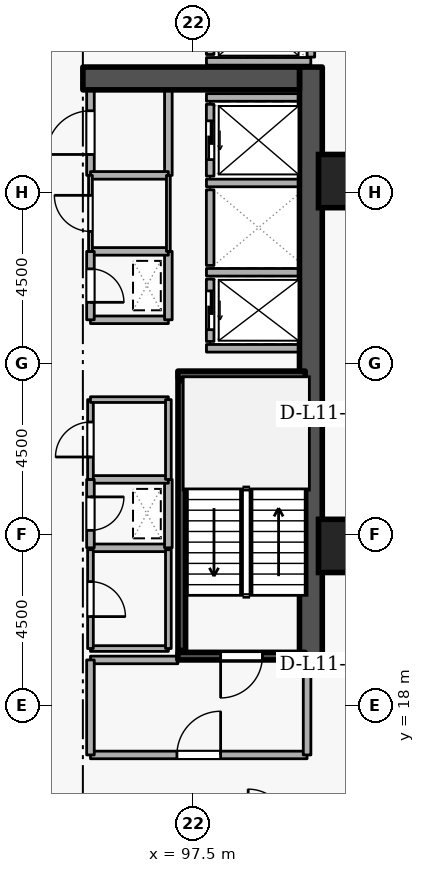
"""IFC4 building model, lengths in metres.
Left out: names, types, materials, properties, quantities, classifications, styles, units other than length and angle.
Written with IfcOpenShell. Run it as: python <this file> out.ifc"""

import sys

from ifc_helpers import new_model, si_unit, direction, frame, frame_2d, origin, origin_2d, place, context, subcontext, project, spatial, rectangle, extrude, element, fill, save


model = new_model("IFC4")
c1 = context("Model", 3, precision=1e-05, world=origin(), true_north=direction((0.0, 1.0)))
c2 = subcontext(c1, "Body", "Model", "MODEL_VIEW")
j1 = project(units=[si_unit("LENGTHUNIT", "METRE"), si_unit("PLANEANGLEUNIT", "RADIAN")], contexts=[c1])
p1 = place(None, origin())
s1 = spatial("IfcSite", under=j1, at=p1, CompositionType="ELEMENT")
p2 = place(p1, origin())
s2 = spatial("IfcBuilding", under=s1, at=p2, CompositionType="ELEMENT")
p3 = place(p2, frame((0.0, 0.0, 45.9)))
s3 = spatial("IfcBuildingStorey", under=s2, at=p3, CompositionType="ELEMENT", Elevation=45.9)
p4 = place(p3, frame((100.6, 19.2, 0.0), z_axis=(0.0, 0.0, 1.0), x_axis=(0.0, 1.0, 0.0)))
e1 = element("IfcWall", 1, at=p4, inside=s3, PredefinedType="SHEAR", context=c2, shape_type="SweptSolid", body=[
    extrude(rectangle(XDim=15.6, YDim=0.6, at=frame_2d((7.8, 0.0))), origin(), (0.0, 0.0, 1.0), 3.6),
])
p5 = place(p3, frame((94.6, 34.5, 0.0), z_axis=(0.0, 0.0, 1.0), x_axis=(1.0, 0.0, 0.0)))
e2 = element("IfcWall", 2, at=p5, inside=s3, PredefinedType="SHEAR", context=c2, shape_type="SweptSolid", body=[
    extrude(rectangle(XDim=5.7, YDim=0.6, at=frame_2d((2.85, 0.0))), origin(), (0.0, 0.0, 1.0), 3.6),
])
for number, where, z_axis, x_axis in (
    (3, (101.5, 22.2, 0.0), (0.0, 0.0, 1.0), (1.0, 0.0, 0.0)),
    (4, (101.5, 31.8, 0.0), (0.0, 0.0, 1.0), (1.0, 0.0, 0.0)),
):
    element("IfcColumn", number, at=place(p3, frame(where, z_axis=z_axis, x_axis=x_axis)), inside=s3, PredefinedType="COLUMN", context=c2, shape_type="SweptSolid", body=[
        extrude(rectangle(XDim=1.4, YDim=1.4, at=origin_2d()), origin(), (0.0, 0.0, 1.0), 3.6),
    ])
p6 = place(p3, frame((97.95, 29.22, 0.0), z_axis=(0.0, 0.0, 1.0), x_axis=(0.0, -1.0, 0.0)))
e5 = element("IfcWall", 5, at=p6, inside=s3, PredefinedType="STANDARD", context=c2, shape_type="SweptSolid", body=[
    extrude(rectangle(XDim=1.64, YDim=0.2, at=frame_2d((0.82, 0.0))), origin(), (0.0, 0.0, 1.0), 3.26),
])
p7 = place(p6, frame((0.31, 0.0, 0.0)))
e6 = element("IfcOpeningElement", 6, at=p7, cuts=e5, PredefinedType="OPENING", context=c2, shape_type="SweptSolid", body=[
    extrude(rectangle(XDim=1.02, YDim=2.06, at=frame_2d((0.51, 1.03))), frame((0.0, 0.11, 0.0), z_axis=(0.0, -1.0, 0.0), x_axis=(1.0, 0.0, 0.0)), (0.0, 0.0, 1.0), 0.22),
])
p8 = place(p3, frame((97.95, 31.57, 0.0), z_axis=(0.0, 0.0, 1.0), x_axis=(0.0, -1.0, 0.0)))
e7 = element("IfcWall", 7, at=p8, inside=s3, PredefinedType="STANDARD", context=c2, shape_type="SweptSolid", body=[
    extrude(rectangle(XDim=1.99, YDim=0.2, at=frame_2d((0.995, 0.0))), origin(), (0.0, 0.0, 1.0), 3.26),
])
p9 = place(p3, frame((97.95, 33.82, 0.0), z_axis=(0.0, 0.0, 1.0), x_axis=(0.0, -1.0, 0.0)))
e8 = element("IfcWall", 8, at=p9, inside=s3, PredefinedType="STANDARD", context=c2, shape_type="SweptSolid", body=[
    extrude(rectangle(XDim=1.89, YDim=0.2, at=frame_2d((0.945, 0.0))), origin(), (0.0, 0.0, 1.0), 3.26),
])
p10 = place(p9, frame((0.435, 0.0, 0.0)))
e9 = element("IfcOpeningElement", 9, at=p10, cuts=e8, PredefinedType="OPENING", context=c2, shape_type="SweptSolid", body=[
    extrude(rectangle(XDim=1.02, YDim=2.06, at=frame_2d((0.51, 1.03))), frame((0.0, 0.11, 0.0), z_axis=(0.0, -1.0, 0.0), x_axis=(1.0, 0.0, 0.0)), (0.0, 0.0, 1.0), 0.22),
])
p11 = place(p3, frame((97.95, 36.87, 0.0), z_axis=(0.0, 0.0, 1.0), x_axis=(0.0, -1.0, 0.0)))
e10 = element("IfcWall", 10, at=p11, inside=s3, PredefinedType="STANDARD", context=c2, shape_type="SweptSolid", body=[
    extrude(rectangle(XDim=1.74, YDim=0.2, at=frame_2d((0.87, 0.0))), origin(), (0.0, 0.0, 1.0), 3.26),
])
p12 = place(p11, frame((0.36, 0.0, 0.0)))
e11 = element("IfcOpeningElement", 11, at=p12, cuts=e10, PredefinedType="OPENING", context=c2, shape_type="SweptSolid", body=[
    extrude(rectangle(XDim=1.02, YDim=2.06, at=frame_2d((0.51, 1.03))), frame((0.0, 0.11, 0.0), z_axis=(0.0, -1.0, 0.0), x_axis=(1.0, 0.0, 0.0)), (0.0, 0.0, 1.0), 0.22),
])
p13 = place(p3, frame((97.852, 29.4, 0.0), z_axis=(0.0, 0.0, 1.0), x_axis=(1.0, 0.0, 0.0)))
e12 = element("IfcWall", 12, at=p13, inside=s3, PredefinedType="STANDARD", context=c2, shape_type="SweptSolid", body=[
    extrude(rectangle(XDim=2.436, YDim=0.2, at=frame_2d((1.218, 0.0))), origin(), (0.0, 0.0, 1.0), 3.26),
])
p14 = place(p3, frame((97.852, 27.4, 0.0), z_axis=(0.0, 0.0, 1.0), x_axis=(1.0, 0.0, 0.0)))
e13 = element("IfcWall", 13, at=p14, inside=s3, PredefinedType="STANDARD", context=c2, shape_type="SweptSolid", body=[
    extrude(rectangle(XDim=2.436, YDim=0.2, at=frame_2d((1.218, 0.0))), origin(), (0.0, 0.0, 1.0), 1.685),
])
for number, where, z_axis, x_axis in (
    (14, (97.852, 31.75, 0.0), (0.0, 0.0, 1.0), (1.0, 0.0, 0.0)),
    (15, (97.852, 34.0, 0.0), (0.0, 0.0, 1.0), (1.0, 0.0, 0.0)),
):
    element("IfcWall", number, at=place(p3, frame(where, z_axis=z_axis, x_axis=x_axis)), inside=s3, PredefinedType="STANDARD", context=c2, shape_type="SweptSolid", body=[
        extrude(rectangle(XDim=2.436, YDim=0.2, at=frame_2d((1.218, 0.0))), origin(), (0.0, 0.0, 1.0), 3.26),
    ])
p15 = place(p3, frame((97.852, 34.95, 0.0), z_axis=(0.0, 0.0, 1.0), x_axis=(1.0, 0.0, 0.0)))
e16 = element("IfcWall", 16, at=p15, inside=s3, PredefinedType="STANDARD", context=c2, shape_type="SweptSolid", body=[
    extrude(rectangle(XDim=2.746, YDim=0.2, at=frame_2d((1.373, 0.0))), origin(), (0.0, 0.0, 1.0), 3.26),
])
p16 = place(p3, frame((100.6, 35.062, 0.0), z_axis=(0.0, 0.0, 1.0), x_axis=(0.0, 1.0, 0.0)))
e17 = element("IfcWall", 17, at=p16, inside=s3, PredefinedType="STANDARD", context=c2, shape_type="SweptSolid", body=[
    extrude(rectangle(XDim=1.856, YDim=0.2, at=frame_2d((0.928, 0.0))), origin(), (0.0, 0.0, 1.0), 3.26),
])
p17 = place(p3, frame((100.45, 19.3, 0.0), z_axis=(0.0, 0.0, 1.0), x_axis=(-1.0, 0.0, 0.0)))
e18 = element("IfcWall", 18, at=p17, inside=s3, PredefinedType="SHEAR", context=c2, shape_type="SweptSolid", body=[
    extrude(rectangle(XDim=3.35, YDim=0.2, at=frame_2d((1.675, 0.0))), origin(), (0.0, 0.0, 1.0), 3.6),
])
p18 = place(p17, frame((1.125, 0.0, 0.0)))
e19 = element("IfcOpeningElement", 19, at=p18, cuts=e18, PredefinedType="OPENING", context=c2, shape_type="SweptSolid", body=[
    extrude(rectangle(XDim=1.1, YDim=2.1, at=frame_2d((0.55, 1.05))), frame((0.0, 0.11, 0.0), z_axis=(0.0, -1.0, 0.0), x_axis=(1.0, 0.0, 0.0)), (0.0, 0.0, 1.0), 0.22),
])
p19 = place(p3, frame((97.1, 26.7, 0.0), z_axis=(0.0, 0.0, 1.0), x_axis=(1.0, 0.0, 0.0)))
e20 = element("IfcWall", 20, at=p19, inside=s3, PredefinedType="SHEAR", context=c2, shape_type="SweptSolid", body=[
    extrude(rectangle(XDim=3.35, YDim=0.2, at=frame_2d((1.675, 0.0))), origin(), (0.0, 0.0, 1.0), 3.6),
])
p20 = place(p3, frame((97.203, 26.55, 0.0), z_axis=(0.0, 0.0, 1.0), x_axis=(0.0, -1.0, 0.0)))
e21 = element("IfcWall", 21, at=p20, inside=s3, PredefinedType="SHEAR", context=c2, shape_type="SweptSolid", body=[
    extrude(rectangle(XDim=7.1, YDim=0.2, at=frame_2d((3.55, 0.0))), origin(), (0.0, 0.0, 1.0), 3.6),
])
p21 = place(p3, frame((94.8, 16.7, 0.0), z_axis=(0.0, 0.0, 1.0), x_axis=(1.0, 0.0, 0.0)))
e22 = element("IfcWall", 22, at=p21, inside=s3, PredefinedType="STANDARD", context=c2, shape_type="SweptSolid", body=[
    extrude(rectangle(XDim=5.7, YDim=0.2, at=frame_2d((2.85, 0.0))), origin(), (0.0, 0.0, 1.0), 3.26),
])
p22 = place(p21, frame((2.275, 0.0, 0.0)))
e23 = element("IfcOpeningElement", 23, at=p22, cuts=e22, PredefinedType="OPENING", context=c2, shape_type="SweptSolid", body=[
    extrude(rectangle(XDim=1.15, YDim=2.1, at=frame_2d((0.575, 1.05))), frame((0.0, 0.11, 0.0), z_axis=(0.0, -1.0, 0.0), x_axis=(1.0, 0.0, 0.0)), (0.0, 0.0, 1.0), 0.22),
])
p23 = place(p3, frame((100.5, 16.7, 0.0), z_axis=(0.0, 0.0, 1.0), x_axis=(0.0, 1.0, 0.0)))
e24 = element("IfcWall", 24, at=p23, inside=s3, PredefinedType="STANDARD", context=c2, shape_type="SweptSolid", body=[
    extrude(rectangle(XDim=2.5, YDim=0.2, at=frame_2d((1.25, 0.0))), origin(), (0.0, 0.0, 1.0), 3.26),
])
p24 = place(p3, frame((97.1, 19.2, 0.0), z_axis=(0.0, 0.0, 1.0), x_axis=(-1.0, 0.0, 0.0)))
e25 = element("IfcWall", 25, at=p24, inside=s3, PredefinedType="STANDARD", context=c2, shape_type="SweptSolid", body=[
    extrude(rectangle(XDim=2.3, YDim=0.2, at=frame_2d((1.15, 0.0))), origin(), (0.0, 0.0, 1.0), 2.465),
])
p25 = place(p3, frame((94.8, 19.2, 0.0), z_axis=(0.0, 0.0, 1.0), x_axis=(0.0, -1.0, 0.0)))
e26 = element("IfcWall", 26, at=p25, inside=s3, PredefinedType="STANDARD", context=c2, shape_type="SweptSolid", body=[
    extrude(rectangle(XDim=2.5, YDim=0.2, at=frame_2d((1.25, 0.0))), origin(), (0.0, 0.0, 1.0), 3.26),
])
p26 = place(p3, frame((94.8, 28.15, 0.0), z_axis=(0.0, 0.0, 1.0), x_axis=(1.0, 0.0, 0.0)))
e27 = element("IfcWall", 27, at=p26, inside=s3, PredefinedType="STANDARD", context=c2, shape_type="SweptSolid", body=[
    extrude(rectangle(XDim=2.05, YDim=0.2, at=frame_2d((1.025, 0.0))), origin(), (0.0, 0.0, 1.0), 3.26),
])
p27 = place(p3, frame((96.85, 28.15, 0.0), z_axis=(0.0, 0.0, 1.0), x_axis=(0.0, 1.0, 0.0)))
e28 = element("IfcWall", 28, at=p27, inside=s3, PredefinedType="STANDARD", context=c2, shape_type="SweptSolid", body=[
    extrude(rectangle(XDim=1.8, YDim=0.2, at=frame_2d((0.9, 0.0))), origin(), (0.0, 0.0, 1.0), 3.26),
])
p28 = place(p3, frame((96.85, 29.95, 0.0), z_axis=(0.0, 0.0, 1.0), x_axis=(-1.0, 0.0, 0.0)))
e29 = element("IfcWall", 29, at=p28, inside=s3, PredefinedType="STANDARD", context=c2, shape_type="SweptSolid", body=[
    extrude(rectangle(XDim=2.05, YDim=0.2, at=frame_2d((1.025, 0.0))), origin(), (0.0, 0.0, 1.0), 3.26),
])
p29 = place(p3, frame((94.8, 29.95, 0.0), z_axis=(0.0, 0.0, 1.0), x_axis=(0.0, -1.0, 0.0)))
e30 = element("IfcWall", 30, at=p29, inside=s3, PredefinedType="STANDARD", context=c2, shape_type="SweptSolid", body=[
    extrude(rectangle(XDim=1.8, YDim=0.2, at=frame_2d((0.9, 0.0))), origin(), (0.0, 0.0, 1.0), 3.26),
])
p30 = place(p29, frame((0.46, 0.0, 0.0)))
e31 = element("IfcOpeningElement", 31, at=p30, cuts=e30, PredefinedType="OPENING", context=c2, shape_type="SweptSolid", body=[
    extrude(rectangle(XDim=0.88, YDim=2.04, at=frame_2d((0.44, 1.02))), frame((0.0, 0.11, 0.0), z_axis=(0.0, -1.0, 0.0), x_axis=(1.0, 0.0, 0.0)), (0.0, 0.0, 1.0), 0.22),
])
p31 = place(p3, frame((94.8, 22.15, 0.0), z_axis=(0.0, 0.0, 1.0), x_axis=(1.0, 0.0, 0.0)))
e32 = element("IfcWall", 32, at=p31, inside=s3, PredefinedType="STANDARD", context=c2, shape_type="SweptSolid", body=[
    extrude(rectangle(XDim=2.05, YDim=0.2, at=frame_2d((1.025, 0.0))), origin(), (0.0, 0.0, 1.0), 3.26),
])
p32 = place(p3, frame((96.85, 22.15, 0.0), z_axis=(0.0, 0.0, 1.0), x_axis=(0.0, 1.0, 0.0)))
e33 = element("IfcWall", 33, at=p32, inside=s3, PredefinedType="STANDARD", context=c2, shape_type="SweptSolid", body=[
    extrude(rectangle(XDim=1.8, YDim=0.2, at=frame_2d((0.9, 0.0))), origin(), (0.0, 0.0, 1.0), 3.26),
])
p33 = place(p3, frame((96.85, 23.95, 0.0), z_axis=(0.0, 0.0, 1.0), x_axis=(-1.0, 0.0, 0.0)))
e34 = element("IfcWall", 34, at=p33, inside=s3, PredefinedType="STANDARD", context=c2, shape_type="SweptSolid", body=[
    extrude(rectangle(XDim=2.05, YDim=0.2, at=frame_2d((1.025, 0.0))), origin(), (0.0, 0.0, 1.0), 3.26),
])
p34 = place(p3, frame((94.8, 23.95, 0.0), z_axis=(0.0, 0.0, 1.0), x_axis=(0.0, -1.0, 0.0)))
e35 = element("IfcWall", 35, at=p34, inside=s3, PredefinedType="STANDARD", context=c2, shape_type="SweptSolid", body=[
    extrude(rectangle(XDim=1.8, YDim=0.2, at=frame_2d((0.9, 0.0))), origin(), (0.0, 0.0, 1.0), 3.26),
])
p35 = place(p34, frame((0.46, 0.0, 0.0)))
e36 = element("IfcOpeningElement", 36, at=p35, cuts=e35, PredefinedType="OPENING", context=c2, shape_type="SweptSolid", body=[
    extrude(rectangle(XDim=0.88, YDim=2.04, at=frame_2d((0.44, 1.02))), frame((0.0, 0.11, 0.0), z_axis=(0.0, -1.0, 0.0), x_axis=(1.0, 0.0, 0.0)), (0.0, 0.0, 1.0), 0.22),
])
p36 = place(p3, frame((94.8, 31.95, 0.0), z_axis=(0.0, 0.0, 1.0), x_axis=(0.0, 1.0, 0.0)))
e37 = element("IfcWall", 37, at=p36, inside=s3, PredefinedType="STANDARD", context=c2, shape_type="SweptSolid", body=[
    extrude(rectangle(XDim=2.25, YDim=0.2, at=frame_2d((1.125, 0.0))), origin(), (0.0, 0.0, 1.0), 3.26),
])
p37 = place(p36, frame((0.55, 0.0, 0.0)))
e38 = element("IfcOpeningElement", 38, at=p37, cuts=e37, PredefinedType="OPENING", context=c2, shape_type="SweptSolid", body=[
    extrude(rectangle(XDim=1.15, YDim=2.1, at=frame_2d((0.575, 1.05))), frame((0.0, 0.11, 0.0), z_axis=(0.0, -1.0, 0.0), x_axis=(1.0, 0.0, 0.0)), (0.0, 0.0, 1.0), 0.22),
])
p38 = place(p3, frame((96.85, 34.2, 0.0), z_axis=(0.0, 0.0, 1.0), x_axis=(0.0, -1.0, 0.0)))
e39 = element("IfcWall", 39, at=p38, inside=s3, PredefinedType="STANDARD", context=c2, shape_type="SweptSolid", body=[
    extrude(rectangle(XDim=2.25, YDim=0.2, at=frame_2d((1.125, 0.0))), origin(), (0.0, 0.0, 1.0), 3.26),
])
p39 = place(p3, frame((96.85, 31.95, 0.0), z_axis=(0.0, 0.0, 1.0), x_axis=(-1.0, 0.0, 0.0)))
e40 = element("IfcWall", 40, at=p39, inside=s3, PredefinedType="STANDARD", context=c2, shape_type="SweptSolid", body=[
    extrude(rectangle(XDim=2.05, YDim=0.2, at=frame_2d((1.025, 0.0))), origin(), (0.0, 0.0, 1.0), 3.26),
])
p40 = place(p3, frame((94.8, 19.5, 0.0), z_axis=(0.0, 0.0, 1.0), x_axis=(1.0, 0.0, 0.0)))
e41 = element("IfcWall", 41, at=p40, inside=s3, PredefinedType="PARTITIONING", context=c2, shape_type="SweptSolid", body=[
    extrude(rectangle(XDim=2.05, YDim=0.15, at=frame_2d((1.025, 0.0))), origin(), (0.0, 0.0, 1.0), 2.465),
])
p41 = place(p3, frame((96.85, 19.5, 0.0), z_axis=(0.0, 0.0, 1.0), x_axis=(0.0, 1.0, 0.0)))
e42 = element("IfcWall", 42, at=p41, inside=s3, PredefinedType="PARTITIONING", context=c2, shape_type="SweptSolid", body=[
    extrude(rectangle(XDim=2.6, YDim=0.15, at=frame_2d((1.3, 0.0))), origin(), (0.0, 0.0, 1.0), 3.26),
])
p42 = place(p3, frame((94.8, 22.1, 0.0), z_axis=(0.0, 0.0, 1.0), x_axis=(0.0, -1.0, 0.0)))
e43 = element("IfcWall", 43, at=p42, inside=s3, PredefinedType="PARTITIONING", context=c2, shape_type="SweptSolid", body=[
    extrude(rectangle(XDim=2.6, YDim=0.15, at=frame_2d((1.3, 0.0))), origin(), (0.0, 0.0, 1.0), 3.26),
])
p43 = place(p42, frame((0.84, 0.0, 0.0)))
e44 = element("IfcOpeningElement", 44, at=p43, cuts=e43, PredefinedType="OPENING", context=c2, shape_type="SweptSolid", body=[
    extrude(rectangle(XDim=0.92, YDim=2.08, at=frame_2d((0.46, 1.04))), frame((0.0, 0.085, 0.0), z_axis=(0.0, -1.0, 0.0), x_axis=(1.0, 0.0, 0.0)), (0.0, 0.0, 1.0), 0.17),
])
p44 = place(p3, frame((94.8, 23.95, 0.0), z_axis=(0.0, 0.0, 1.0), x_axis=(0.0, 1.0, 0.0)))
e45 = element("IfcWall", 45, at=p44, inside=s3, PredefinedType="PARTITIONING", context=c2, shape_type="SweptSolid", body=[
    extrude(rectangle(XDim=2.1, YDim=0.15, at=frame_2d((1.05, 0.0))), origin(), (0.0, 0.0, 1.0), 3.26),
])
p45 = place(p44, frame((0.59, 0.0, 0.0)))
e46 = element("IfcOpeningElement", 46, at=p45, cuts=e45, PredefinedType="OPENING", context=c2, shape_type="SweptSolid", body=[
    extrude(rectangle(XDim=0.92, YDim=2.08, at=frame_2d((0.46, 1.04))), frame((0.0, 0.085, 0.0), z_axis=(0.0, -1.0, 0.0), x_axis=(1.0, 0.0, 0.0)), (0.0, 0.0, 1.0), 0.17),
])
p46 = place(p3, frame((94.8, 26.05, 0.0), z_axis=(0.0, 0.0, 1.0), x_axis=(1.0, 0.0, 0.0)))
e47 = element("IfcWall", 47, at=p46, inside=s3, PredefinedType="PARTITIONING", context=c2, shape_type="SweptSolid", body=[
    extrude(rectangle(XDim=2.05, YDim=0.15, at=frame_2d((1.025, 0.0))), origin(), (0.0, 0.0, 1.0), 3.26),
])
p47 = place(p3, frame((96.85, 26.05, 0.0), z_axis=(0.0, 0.0, 1.0), x_axis=(0.0, -1.0, 0.0)))
e48 = element("IfcWall", 48, at=p47, inside=s3, PredefinedType="PARTITIONING", context=c2, shape_type="SweptSolid", body=[
    extrude(rectangle(XDim=2.1, YDim=0.15, at=frame_2d((1.05, 0.0))), origin(), (0.0, 0.0, 1.0), 3.26),
])
p48 = place(p3, frame((94.8, 29.95, 0.0), z_axis=(0.0, 0.0, 1.0), x_axis=(0.0, 1.0, 0.0)))
e49 = element("IfcWall", 49, at=p48, inside=s3, PredefinedType="PARTITIONING", context=c2, shape_type="SweptSolid", body=[
    extrude(rectangle(XDim=2.0, YDim=0.1, at=frame_2d((1.0, 0.0))), origin(), (0.0, 0.0, 1.0), 3.26),
])
p49 = place(p48, frame((0.525, 0.0, 0.0)))
e50 = element("IfcOpeningElement", 50, at=p49, cuts=e49, PredefinedType="OPENING", context=c2, shape_type="SweptSolid", body=[
    extrude(rectangle(XDim=0.95, YDim=2.1, at=frame_2d((0.475, 1.05))), frame((0.0, 0.06, 0.0), z_axis=(0.0, -1.0, 0.0), x_axis=(1.0, 0.0, 0.0)), (0.0, 0.0, 1.0), 0.12),
])
p50 = place(p3, frame((96.85, 31.95, 0.0), z_axis=(0.0, 0.0, 1.0), x_axis=(0.0, -1.0, 0.0)))
e51 = element("IfcWall", 51, at=p50, inside=s3, PredefinedType="PARTITIONING", context=c2, shape_type="SweptSolid", body=[
    extrude(rectangle(XDim=2.0, YDim=0.1, at=frame_2d((1.0, 0.0))), origin(), (0.0, 0.0, 1.0), 3.26),
])
p51 = place(p7, origin())
e52 = element("IfcDoor", 52, at=p51, inside=s3, OperationType="SLIDING_TO_LEFT", PredefinedType="DOOR", context=c2, shape_type="SweptSolid", body=[
    extrude(rectangle(XDim=1.02, YDim=2.06, at=frame_2d((0.51, 1.03))), frame((0.0, 0.025, 0.0), z_axis=(0.0, -1.0, 0.0), x_axis=(1.0, 0.0, 0.0)), (0.0, 0.0, 1.0), 0.05),
])
fill(e6, e52)
p52 = place(p10, origin())
e53 = element("IfcDoor", 53, at=p52, inside=s3, OperationType="SLIDING_TO_LEFT", PredefinedType="DOOR", context=c2, shape_type="SweptSolid", body=[
    extrude(rectangle(XDim=1.02, YDim=2.06, at=frame_2d((0.51, 1.03))), frame((0.0, 0.025, 0.0), z_axis=(0.0, -1.0, 0.0), x_axis=(1.0, 0.0, 0.0)), (0.0, 0.0, 1.0), 0.05),
])
fill(e9, e53)
p53 = place(p18, origin())
e54 = element("IfcDoor", 54, at=p53, inside=s3, OperationType="SINGLE_SWING_RIGHT", PredefinedType="DOOR", context=c2, shape_type="SweptSolid", body=[
    extrude(rectangle(XDim=1.1, YDim=2.1, at=frame_2d((0.55, 1.05))), frame((0.0, 0.025, 0.0), z_axis=(0.0, -1.0, 0.0), x_axis=(1.0, 0.0, 0.0)), (0.0, 0.0, 1.0), 0.05),
])
fill(e19, e54)
p54 = place(p22, origin())
e55 = element("IfcDoor", 55, at=p54, inside=s3, OperationType="SINGLE_SWING_RIGHT", PredefinedType="DOOR", context=c2, shape_type="SweptSolid", body=[
    extrude(rectangle(XDim=1.15, YDim=2.1, at=frame_2d((0.575, 1.05))), frame((0.0, 0.025, 0.0), z_axis=(0.0, -1.0, 0.0), x_axis=(1.0, 0.0, 0.0)), (0.0, 0.0, 1.0), 0.05),
])
fill(e23, e55)
p55 = place(p30, origin())
e56 = element("IfcDoor", 56, at=p55, inside=s3, OperationType="SINGLE_SWING_RIGHT", PredefinedType="DOOR", context=c2, shape_type="SweptSolid", body=[
    extrude(rectangle(XDim=0.88, YDim=2.04, at=frame_2d((0.44, 1.02))), frame((0.0, 0.025, 0.0), z_axis=(0.0, -1.0, 0.0), x_axis=(1.0, 0.0, 0.0)), (0.0, 0.0, 1.0), 0.05),
])
fill(e31, e56)
p56 = place(p35, origin())
e57 = element("IfcDoor", 57, at=p56, inside=s3, OperationType="SINGLE_SWING_LEFT", PredefinedType="DOOR", context=c2, shape_type="SweptSolid", body=[
    extrude(rectangle(XDim=0.88, YDim=2.04, at=frame_2d((0.44, 1.02))), frame((0.0, 0.025, 0.0), z_axis=(0.0, -1.0, 0.0), x_axis=(1.0, 0.0, 0.0)), (0.0, 0.0, 1.0), 0.05),
])
fill(e36, e57)
p57 = place(p43, origin())
e58 = element("IfcDoor", 58, at=p57, inside=s3, OperationType="SINGLE_SWING_RIGHT", PredefinedType="DOOR", context=c2, shape_type="SweptSolid", body=[
    extrude(rectangle(XDim=0.92, YDim=2.08, at=frame_2d((0.46, 1.04))), frame((0.0, 0.025, 0.0), z_axis=(0.0, -1.0, 0.0), x_axis=(1.0, 0.0, 0.0)), (0.0, 0.0, 1.0), 0.05),
])
fill(e44, e58)
p58 = place(p45, origin())
e59 = element("IfcDoor", 59, at=p58, inside=s3, OperationType="SINGLE_SWING_LEFT", PredefinedType="DOOR", context=c2, shape_type="SweptSolid", body=[
    extrude(rectangle(XDim=0.92, YDim=2.08, at=frame_2d((0.46, 1.04))), frame((0.0, 0.025, 0.0), z_axis=(0.0, -1.0, 0.0), x_axis=(1.0, 0.0, 0.0)), (0.0, 0.0, 1.0), 0.05),
])
fill(e46, e59)
p59 = place(p49, origin())
e60 = element("IfcDoor", 60, at=p59, inside=s3, OperationType="SINGLE_SWING_RIGHT", PredefinedType="DOOR", context=c2, shape_type="SweptSolid", body=[
    extrude(rectangle(XDim=0.95, YDim=2.1, at=frame_2d((0.475, 1.05))), frame((0.0, 0.025, 0.0), z_axis=(0.0, -1.0, 0.0), x_axis=(1.0, 0.0, 0.0)), (0.0, 0.0, 1.0), 0.05),
])
fill(e50, e60)
p60 = place(p37, origin())
e61 = element("IfcDoor", 61, at=p60, inside=s3, OperationType="SINGLE_SWING_LEFT", PredefinedType="DOOR", context=c2, shape_type="SweptSolid", body=[
    extrude(rectangle(XDim=1.15, YDim=2.1, at=frame_2d((0.575, 1.05))), frame((0.0, 0.025, 0.0), z_axis=(0.0, -1.0, 0.0), x_axis=(1.0, 0.0, 0.0)), (0.0, 0.0, 1.0), 0.05),
])
fill(e38, e61)
save(model, sys.argv[1])
